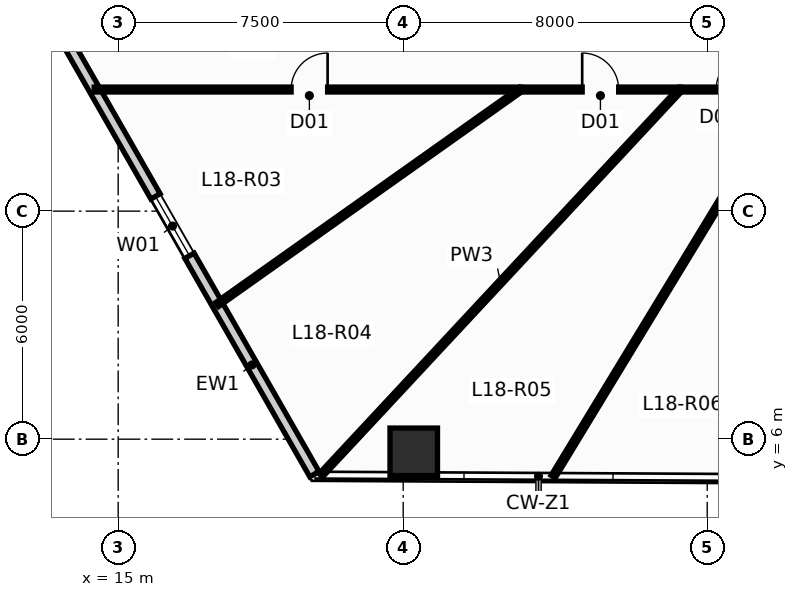
"""IFC4 building model, lengths in metres.
Left out: names, types, materials, properties, quantities, classifications, styles, units other than length and angle.
Written with IfcOpenShell. Run it as: python <this file> out.ifc"""

import sys

from ifc_helpers import new_model, si_unit, direction, frame, frame_2d, origin, origin_2d, place, context, subcontext, project, spatial, rectangle, hollow_rectangle, extrude, source, transform, mapped, element, fill, save


model = new_model("IFC4")
c1 = context("Model", 3, precision=1e-05, world=origin(), true_north=direction((0.0, 1.0)))
c2 = subcontext(c1, "Body", "Model", "MODEL_VIEW")
j1 = project(units=[si_unit("LENGTHUNIT", "METRE"), si_unit("PLANEANGLEUNIT", "RADIAN")], contexts=[c1])
p1 = place(None, origin())
s1 = spatial("IfcSite", under=j1, at=p1, CompositionType="ELEMENT")
p2 = place(p1, origin())
s2 = spatial("IfcBuilding", under=s1, at=p2, CompositionType="ELEMENT")
p3 = place(p2, frame((0.0, 0.0, 71.4)))
s3 = spatial("IfcBuildingStorey", under=s2, at=p3, CompositionType="ELEMENT", Elevation=71.4)
m1 = source(origin(), c2, "Body", "SweptSolid", [
    extrude(hollow_rectangle(XDim=1.25, YDim=1.25, WallThickness=0.07, at=origin_2d()), origin(), (0.0, 0.0, 1.0), 3.651),
])
p4 = place(p3, frame((22.778, 5.667, 0.0), z_axis=(-0.013440050965, 0.019859179784, 0.999712447661), x_axis=(-0.828169210203, -0.560478152359, 0.0)))
e1 = element("IfcColumn", 1, at=p4, inside=s3, PredefinedType="COLUMN", context=c2, shape_type="MappedRepresentation", body=[
    mapped(m1, transform((0.0, 0.0, 0.0), scale=1.0)),
])
p5 = place(p3, frame((20.164, 5.08, 0.0), z_axis=(0.0, 0.0, 1.0), x_axis=(-0.496610912016, 0.867973272668, 0.0)))
e2 = element("IfcWall", 2, at=p5, inside=s3, PredefinedType="STANDARD", context=c2, shape_type="SweptSolid", body=[
    extrude(rectangle(XDim=15.039, YDim=0.28, at=frame_2d((7.519, 0.0))), origin(), (0.0, 0.0, 1.0), 3.25),
])
p6 = place(p5, frame((6.62, 0.0, 0.9)))
e3 = element("IfcOpeningElement", 3, at=p6, cuts=e2, PredefinedType="OPENING", context=c2, shape_type="SweptSolid", body=[
    extrude(rectangle(XDim=1.8, YDim=1.8, at=frame_2d((0.9, 0.9))), frame((0.0, 0.152, 0.0), z_axis=(0.0, -1.0, 0.0), x_axis=(1.0, 0.0, 0.0)), (0.0, 0.0, 1.0), 0.304),
])
p7 = place(p3, frame((20.331, 5.048, 0.0), z_axis=(0.0, 0.0, 1.0), x_axis=(0.681708470402, 0.731623920729, 0.0)))
e4 = element("IfcWall", 4, at=p7, inside=s3, PredefinedType="PARTITIONING", context=c2, shape_type="SweptSolid", body=[
    extrude(rectangle(XDim=13.871, YDim=0.13, at=frame_2d((6.936, 0.0))), origin(), (0.0, 0.0, 1.0), 2.633),
])
p8 = place(p3, frame((26.448, 5.014, 0.0), z_axis=(0.0, 0.0, 1.0), x_axis=(0.519452848137, 0.854499115601, 0.0)))
e5 = element("IfcWall", 5, at=p8, inside=s3, PredefinedType="PARTITIONING", context=c2, shape_type="SweptSolid", body=[
    extrude(rectangle(XDim=11.915, YDim=0.13, at=frame_2d((5.958, 0.0))), origin(), (0.0, 0.0, 1.0), 3.25),
])
p9 = place(p3, frame((14.368, 15.2, 0.0), z_axis=(0.0, 0.0, 1.0), x_axis=(1.0, 0.0, 0.0)))
e6 = element("IfcWall", 6, at=p9, inside=s3, PredefinedType="PARTITIONING", context=c2, shape_type="SweptSolid", body=[
    extrude(rectangle(XDim=11.217, YDim=0.13, at=frame_2d((5.608, 0.0))), origin(), (0.0, 0.0, 1.0), 3.25),
])
p10 = place(p9, frame((5.183, 0.0, 0.0)))
e7 = element("IfcOpeningElement", 7, at=p10, cuts=e6, PredefinedType="OPENING", context=c2, shape_type="SweptSolid", body=[
    extrude(rectangle(XDim=0.96, YDim=2.15, at=frame_2d((0.48, 1.075))), frame((0.0, 0.077, 0.0), z_axis=(0.0, -1.0, 0.0), x_axis=(1.0, 0.0, 0.0)), (0.0, 0.0, 1.0), 0.154),
])
p11 = place(p3, frame((17.605, 9.543, 0.0), z_axis=(0.0, 0.0, 1.0), x_axis=(0.815990631246, 0.578065125846, 0.0)))
e8 = element("IfcWall", 8, at=p11, inside=s3, PredefinedType="PARTITIONING", context=c2, shape_type="SweptSolid", body=[
    extrude(rectangle(XDim=9.781, YDim=0.13, at=frame_2d((4.891, 0.0))), origin(), (0.0, 0.0, 1.0), 3.25),
])
p12 = place(p3, frame((25.595, 15.2, 0.0), z_axis=(0.0, 0.0, 1.0), x_axis=(1.0, 0.0, 0.0)))
e9 = element("IfcWall", 9, at=p12, inside=s3, PredefinedType="PARTITIONING", context=c2, shape_type="SweptSolid", body=[
    extrude(rectangle(XDim=4.19, YDim=0.13, at=frame_2d((2.095, 0.0))), origin(), (0.0, 0.0, 1.0), 3.25),
])
p13 = place(p12, frame((1.615, 0.0, 0.0)))
e10 = element("IfcOpeningElement", 10, at=p13, cuts=e9, PredefinedType="OPENING", context=c2, shape_type="SweptSolid", body=[
    extrude(rectangle(XDim=0.96, YDim=2.15, at=frame_2d((0.48, 1.075))), frame((0.0, 0.077, 0.0), z_axis=(0.0, -1.0, 0.0), x_axis=(1.0, 0.0, 0.0)), (0.0, 0.0, 1.0), 0.154),
])
p14 = place(p3, frame((29.795, 15.2, 0.0), z_axis=(0.0, 0.0, 1.0), x_axis=(1.0, 0.0, 0.0)))
e11 = element("IfcWall", 11, at=p14, inside=s3, PredefinedType="PARTITIONING", context=c2, shape_type="SweptSolid", body=[
    extrude(rectangle(XDim=2.84, YDim=0.13, at=frame_2d((1.42, 0.0))), origin(), (0.0, 0.0, 1.0), 2.876),
])
p15 = place(p14, frame((0.94, 0.0, 0.0)))
e12 = element("IfcOpeningElement", 12, at=p15, cuts=e11, PredefinedType="OPENING", context=c2, shape_type="SweptSolid", body=[
    extrude(rectangle(XDim=0.96, YDim=2.15, at=frame_2d((0.48, 1.075))), frame((0.0, 0.077, 0.0), z_axis=(0.0, -1.0, 0.0), x_axis=(1.0, 0.0, 0.0)), (0.0, 0.0, 1.0), 0.154),
])
p16 = place(p6, origin())
e13 = element("IfcWindow", 13, at=p16, inside=s3, PartitioningType="SINGLE_PANEL", PredefinedType="WINDOW", context=c2, shape_type="SweptSolid", body=[
    extrude(rectangle(XDim=1.8, YDim=1.8, at=frame_2d((0.9, 0.9))), frame((0.0, 0.03, 0.0), z_axis=(0.0, -1.0, 0.0), x_axis=(1.0, 0.0, 0.0)), (0.0, 0.0, 1.0), 0.06),
])
fill(e3, e13)
p17 = place(p10, origin())
e14 = element("IfcDoor", 14, at=p17, inside=s3, OperationType="SINGLE_SWING_RIGHT", PredefinedType="DOOR", context=c2, shape_type="SweptSolid", body=[
    extrude(rectangle(XDim=0.96, YDim=2.15, at=frame_2d((0.48, 1.075))), frame((0.0, 0.025, 0.0), z_axis=(0.0, -1.0, 0.0), x_axis=(1.0, 0.0, 0.0)), (0.0, 0.0, 1.0), 0.05),
])
fill(e7, e14)
p18 = place(p13, origin())
e15 = element("IfcDoor", 15, at=p18, inside=s3, OperationType="SINGLE_SWING_LEFT", PredefinedType="DOOR", context=c2, shape_type="SweptSolid", body=[
    extrude(rectangle(XDim=0.96, YDim=2.15, at=frame_2d((0.48, 1.075))), frame((0.0, 0.025, 0.0), z_axis=(0.0, -1.0, 0.0), x_axis=(1.0, 0.0, 0.0)), (0.0, 0.0, 1.0), 0.05),
])
fill(e10, e15)
p19 = place(p15, origin())
e16 = element("IfcDoor", 16, at=p19, inside=s3, OperationType="SINGLE_SWING_RIGHT", PredefinedType="DOOR", context=c2, shape_type="SweptSolid", body=[
    extrude(rectangle(XDim=0.96, YDim=2.15, at=frame_2d((0.48, 1.075))), frame((0.0, 0.025, 0.0), z_axis=(0.0, -1.0, 0.0), x_axis=(1.0, 0.0, 0.0)), (0.0, 0.0, 1.0), 0.05),
])
fill(e12, e16)
save(model, sys.argv[1])
